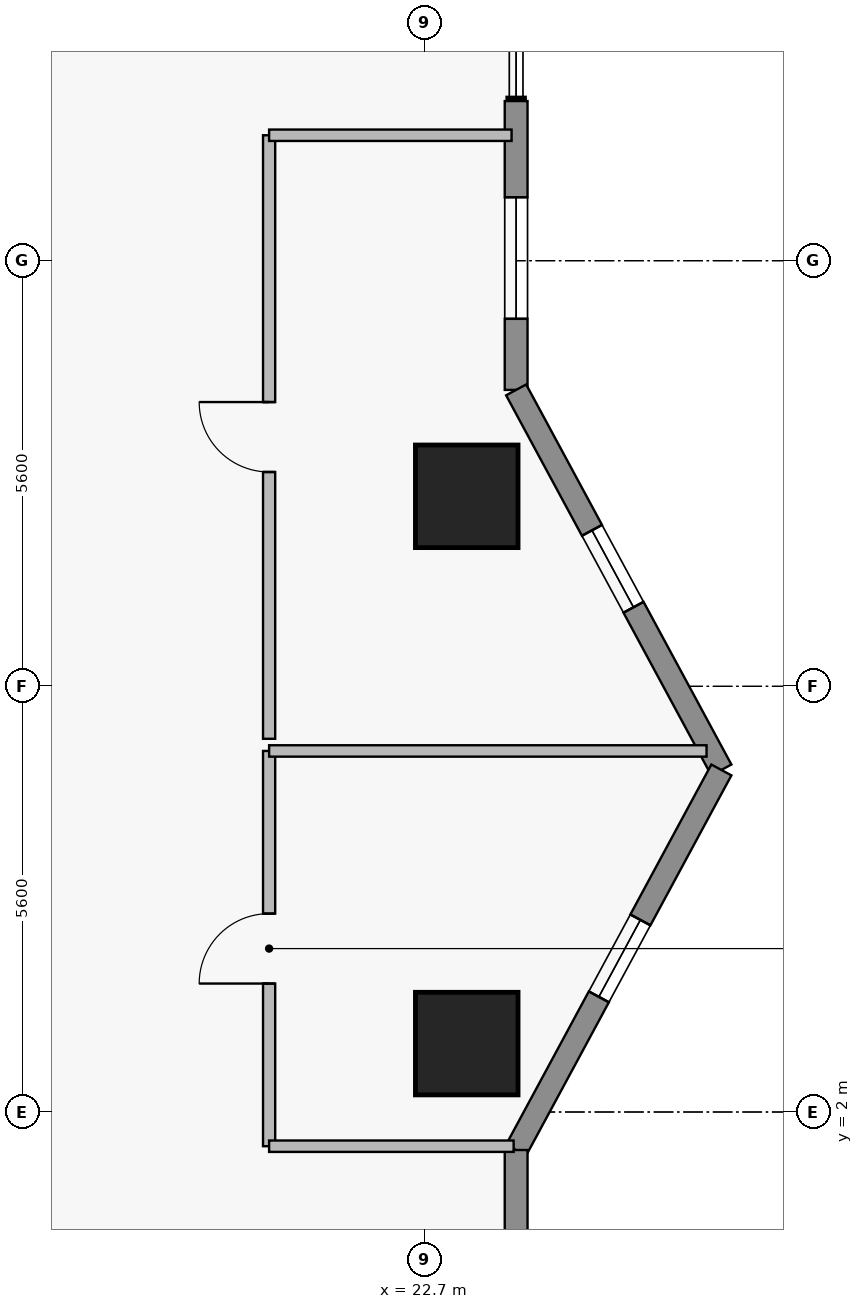
"""IFC4 building model, lengths in metres.
Left out: names, types, materials, properties, quantities, classifications, styles, units other than length and angle.
Written with IfcOpenShell. Run it as: python <this file> out.ifc"""

import sys

from ifc_helpers import new_model, si_unit, direction, frame, frame_2d, origin, origin_2d, place, context, subcontext, project, spatial, rectangle, extrude, element, fill, save


model = new_model("IFC4")
c1 = context("Model", 3, precision=1e-05, world=origin(), true_north=direction((0.0, 1.0)))
c2 = subcontext(c1, "Body", "Model", "MODEL_VIEW")
j1 = project(units=[si_unit("LENGTHUNIT", "METRE"), si_unit("PLANEANGLEUNIT", "RADIAN")], contexts=[c1])
p1 = place(None, origin())
s1 = spatial("IfcSite", under=j1, at=p1, CompositionType="ELEMENT")
p2 = place(p1, origin())
s2 = spatial("IfcBuilding", under=s1, at=p2, CompositionType="ELEMENT")
p3 = place(p2, frame((0.0, 0.0, 106.6)))
s3 = spatial("IfcBuildingStorey", under=s2, at=p3, CompositionType="ELEMENT", Elevation=106.6)
for number, where, z_axis, x_axis in (
    (1, (23.25, 2.9, 0.0), (0.0, 0.0, 1.0), (1.0, 0.0, 0.0)),
    (2, (23.25, 10.1, 0.0), (0.0, 0.0, 1.0), (1.0, 0.0, 0.0)),
):
    element("IfcColumn", number, at=place(p3, frame(where, z_axis=z_axis, x_axis=x_axis)), inside=s3, PredefinedType="COLUMN", context=c2, shape_type="SweptSolid", body=[
        extrude(rectangle(XDim=1.35, YDim=1.35, at=origin_2d()), origin(), (0.0, 0.0, 1.0), 3.65),
    ])
p4 = place(p3, frame((23.9, 15.3, 0.0), z_axis=(0.0, 0.0, 1.0), x_axis=(0.0, -1.0, 0.0)))
e3 = element("IfcWall", 3, at=p4, inside=s3, PredefinedType="STANDARD", context=c2, shape_type="SweptSolid", body=[
    extrude(rectangle(XDim=3.8, YDim=0.3, at=frame_2d((1.9, 0.0))), origin(), (0.0, 0.0, 1.0), 3.43),
])
p5 = place(p4, frame((1.265, 0.0, 0.85)))
e4 = element("IfcOpeningElement", 4, at=p5, cuts=e3, PredefinedType="OPENING", context=c2, shape_type="SweptSolid", body=[
    extrude(rectangle(XDim=1.6, YDim=1.8, at=frame_2d((0.8, 0.9))), frame((0.0, 0.16, 0.0), z_axis=(0.0, -1.0, 0.0), x_axis=(1.0, 0.0, 0.0)), (0.0, 0.0, 1.0), 0.32),
])
p6 = place(p3, frame((23.9, 11.5, 0.0), z_axis=(0.0, 0.0, 1.0), x_axis=(0.475175525499, -0.879891027325, 0.0)))
e5 = element("IfcWall", 5, at=p6, inside=s3, PredefinedType="STANDARD", context=c2, shape_type="SweptSolid", body=[
    extrude(rectangle(XDim=5.683, YDim=0.3, at=frame_2d((2.841, 0.0))), origin(), (0.0, 0.0, 1.0), 3.43),
])
p7 = place(p6, frame((2.1, 0.0, 1.25)))
e6 = element("IfcOpeningElement", 6, at=p7, cuts=e5, PredefinedType="OPENING", context=c2, shape_type="SweptSolid", body=[
    extrude(rectangle(XDim=1.15, YDim=1.55, at=frame_2d((0.575, 0.775))), frame((0.0, 0.16, 0.0), z_axis=(0.0, -1.0, 0.0), x_axis=(1.0, 0.0, 0.0)), (0.0, 0.0, 1.0), 0.32),
])
p8 = place(p3, frame((26.6, 6.5, 0.0), z_axis=(0.0, 0.0, 1.0), x_axis=(-0.475175525499, -0.879891027325, 0.0)))
e7 = element("IfcWall", 7, at=p8, inside=s3, PredefinedType="STANDARD", context=c2, shape_type="SweptSolid", body=[
    extrude(rectangle(XDim=5.683, YDim=0.3, at=frame_2d((2.841, 0.0))), origin(), (0.0, 0.0, 1.0), 3.43),
])
p9 = place(p8, frame((2.242, 0.0, 1.25)))
e8 = element("IfcOpeningElement", 8, at=p9, cuts=e7, PredefinedType="OPENING", context=c2, shape_type="SweptSolid", body=[
    extrude(rectangle(XDim=1.15, YDim=1.55, at=frame_2d((0.575, 0.775))), frame((0.0, 0.16, 0.0), z_axis=(0.0, -1.0, 0.0), x_axis=(1.0, 0.0, 0.0)), (0.0, 0.0, 1.0), 0.32),
])
p10 = place(p3, frame((23.9, 1.5, 0.0), z_axis=(0.0, 0.0, 1.0), x_axis=(0.0, -1.0, 0.0)))
e9 = element("IfcWall", 9, at=p10, inside=s3, PredefinedType="STANDARD", context=c2, shape_type="SweptSolid", body=[
    extrude(rectangle(XDim=1.15, YDim=0.3, at=frame_2d((0.575, 0.0))), origin(), (0.0, 0.0, 1.0), 3.43),
])
p11 = place(p3, frame((20.65, 1.55, 0.0), z_axis=(0.0, 0.0, 1.0), x_axis=(0.0, 1.0, 0.0)))
e10 = element("IfcWall", 10, at=p11, inside=s3, PredefinedType="PARTITIONING", context=c2, shape_type="SweptSolid", body=[
    extrude(rectangle(XDim=5.2, YDim=0.16, at=frame_2d((2.6, 0.0))), origin(), (0.0, 0.0, 1.0), 3.43),
])
p12 = place(p11, frame((2.14, 0.0, 0.0)))
e11 = element("IfcOpeningElement", 11, at=p12, cuts=e10, PredefinedType="OPENING", context=c2, shape_type="SweptSolid", body=[
    extrude(rectangle(XDim=0.92, YDim=2.12, at=frame_2d((0.46, 1.06))), frame((0.0, 0.09, 0.0), z_axis=(0.0, -1.0, 0.0), x_axis=(1.0, 0.0, 0.0)), (0.0, 0.0, 1.0), 0.18),
])
p13 = place(p3, frame((20.65, 6.91, 0.0), z_axis=(0.0, 0.0, 1.0), x_axis=(0.0, 1.0, 0.0)))
e12 = element("IfcWall", 12, at=p13, inside=s3, PredefinedType="PARTITIONING", context=c2, shape_type="SweptSolid", body=[
    extrude(rectangle(XDim=7.94, YDim=0.16, at=frame_2d((3.97, 0.0))), origin(), (0.0, 0.0, 1.0), 3.43),
])
p14 = place(p13, frame((3.51, 0.0, 0.0)))
e13 = element("IfcOpeningElement", 13, at=p14, cuts=e12, PredefinedType="OPENING", context=c2, shape_type="SweptSolid", body=[
    extrude(rectangle(XDim=0.92, YDim=2.12, at=frame_2d((0.46, 1.06))), frame((0.0, 0.09, 0.0), z_axis=(0.0, -1.0, 0.0), x_axis=(1.0, 0.0, 0.0)), (0.0, 0.0, 1.0), 0.18),
])
p15 = place(p3, frame((20.65, 1.55, 0.0), z_axis=(0.0, 0.0, 1.0), x_axis=(1.0, 0.0, 0.0)))
e14 = element("IfcWall", 14, at=p15, inside=s3, PredefinedType="PARTITIONING", context=c2, shape_type="SweptSolid", body=[
    extrude(rectangle(XDim=3.217, YDim=0.15, at=frame_2d((1.608, 0.0))), origin(), (0.0, 0.0, 1.0), 3.43),
])
p16 = place(p3, frame((20.65, 6.75, 0.0), z_axis=(0.0, 0.0, 1.0), x_axis=(1.0, 0.0, 0.0)))
e15 = element("IfcWall", 15, at=p16, inside=s3, PredefinedType="PARTITIONING", context=c2, shape_type="SweptSolid", body=[
    extrude(rectangle(XDim=5.755, YDim=0.15, at=frame_2d((2.877, 0.0))), origin(), (0.0, 0.0, 1.0), 3.43),
])
p17 = place(p3, frame((20.65, 14.85, 0.0), z_axis=(0.0, 0.0, 1.0), x_axis=(1.0, 0.0, 0.0)))
e16 = element("IfcWall", 16, at=p17, inside=s3, PredefinedType="PARTITIONING", context=c2, shape_type="SweptSolid", body=[
    extrude(rectangle(XDim=3.19, YDim=0.15, at=frame_2d((1.595, 0.0))), origin(), (0.0, 0.0, 1.0), 3.43),
])
p18 = place(p5, origin())
e17 = element("IfcWindow", 17, at=p18, inside=s3, PartitioningType="SINGLE_PANEL", PredefinedType="WINDOW", context=c2, shape_type="SweptSolid", body=[
    extrude(rectangle(XDim=1.6, YDim=1.8, at=frame_2d((0.8, 0.9))), frame((0.0, 0.03, 0.0), z_axis=(0.0, -1.0, 0.0), x_axis=(1.0, 0.0, 0.0)), (0.0, 0.0, 1.0), 0.06),
])
fill(e4, e17)
p19 = place(p7, origin())
e18 = element("IfcWindow", 18, at=p19, inside=s3, PartitioningType="SINGLE_PANEL", PredefinedType="WINDOW", context=c2, shape_type="SweptSolid", body=[
    extrude(rectangle(XDim=1.15, YDim=1.55, at=frame_2d((0.575, 0.775))), frame((0.0, 0.03, 0.0), z_axis=(0.0, -1.0, 0.0), x_axis=(1.0, 0.0, 0.0)), (0.0, 0.0, 1.0), 0.06),
])
fill(e6, e18)
p20 = place(p9, origin())
e19 = element("IfcWindow", 19, at=p20, inside=s3, PartitioningType="SINGLE_PANEL", PredefinedType="WINDOW", context=c2, shape_type="SweptSolid", body=[
    extrude(rectangle(XDim=1.15, YDim=1.55, at=frame_2d((0.575, 0.775))), frame((0.0, 0.03, 0.0), z_axis=(0.0, -1.0, 0.0), x_axis=(1.0, 0.0, 0.0)), (0.0, 0.0, 1.0), 0.06),
])
fill(e8, e19)
p21 = place(p12, origin())
e20 = element("IfcDoor", 20, at=p21, inside=s3, OperationType="SINGLE_SWING_LEFT", PredefinedType="DOOR", context=c2, shape_type="SweptSolid", body=[
    extrude(rectangle(XDim=0.92, YDim=2.12, at=frame_2d((0.46, 1.06))), frame((0.0, 0.025, 0.0), z_axis=(0.0, -1.0, 0.0), x_axis=(1.0, 0.0, 0.0)), (0.0, 0.0, 1.0), 0.05),
])
fill(e11, e20)
p22 = place(p14, origin())
e21 = element("IfcDoor", 21, at=p22, inside=s3, OperationType="SINGLE_SWING_RIGHT", PredefinedType="DOOR", context=c2, shape_type="SweptSolid", body=[
    extrude(rectangle(XDim=0.92, YDim=2.12, at=frame_2d((0.46, 1.06))), frame((0.0, 0.025, 0.0), z_axis=(0.0, -1.0, 0.0), x_axis=(1.0, 0.0, 0.0)), (0.0, 0.0, 1.0), 0.05),
])
fill(e13, e21)
save(model, sys.argv[1])
